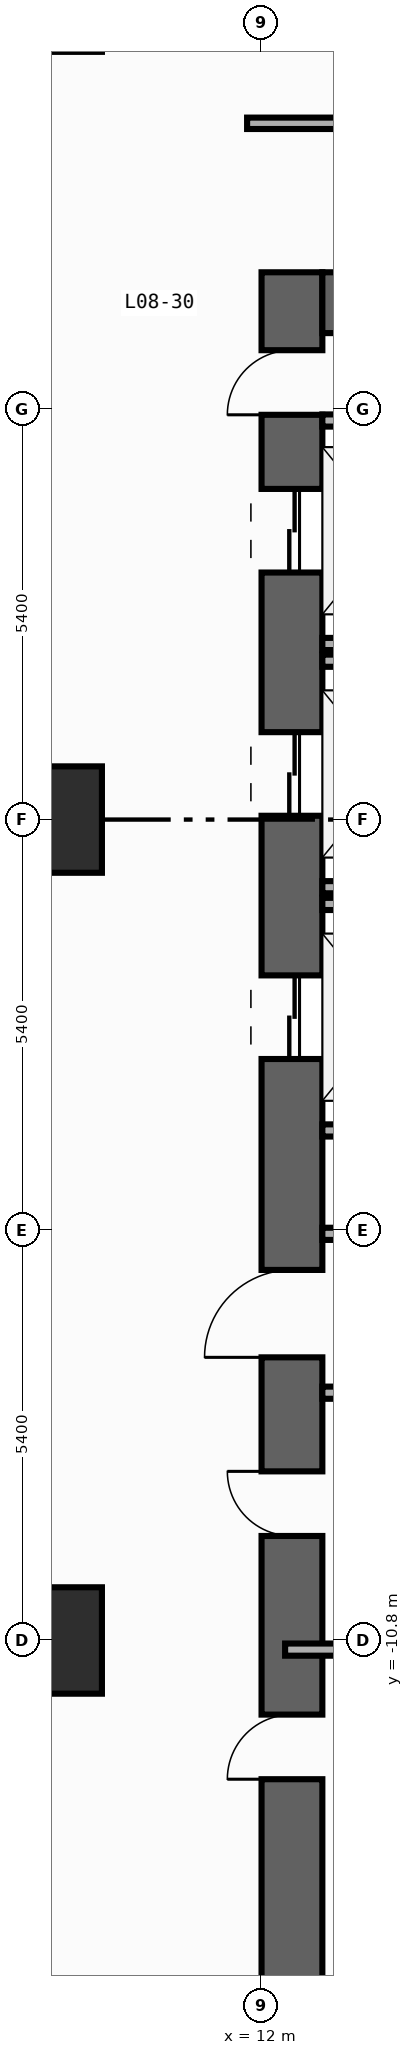
"""IFC4 building model, lengths in metres.
Left out: names, types, materials, properties, quantities, classifications, styles, units other than length and angle.
Written with IfcOpenShell. Run it as: python <this file> out.ifc"""

import sys

from ifc_helpers import new_model, si_unit, direction, frame, frame_2d, origin, origin_2d, place, context, subcontext, project, spatial, rectangle, extrude, element, fill, save


model = new_model("IFC4")
c1 = context("Model", 3, precision=1e-05, world=origin(), true_north=direction((0.0, 1.0)))
c2 = subcontext(c1, "Body", "Model", "MODEL_VIEW")
j1 = project(units=[si_unit("LENGTHUNIT", "METRE"), si_unit("PLANEANGLEUNIT", "RADIAN")], contexts=[c1])
p1 = place(None, origin())
s1 = spatial("IfcSite", under=j1, at=p1, CompositionType="ELEMENT")
p2 = place(p1, origin())
s2 = spatial("IfcBuilding", under=s1, at=p2, CompositionType="ELEMENT")
p3 = place(p2, frame((0.0, 0.0, 34.4)))
s3 = spatial("IfcBuildingStorey", under=s2, at=p3, CompositionType="ELEMENT", Elevation=34.4)
p4 = place(p3, frame((12.4, -19.8, 0.0), z_axis=(0.0, 0.0, 1.0), x_axis=(0.0, 1.0, 0.0)))
e1 = element("IfcWall", 1, at=p4, inside=s3, PredefinedType="SHEAR", context=c2, shape_type="SweptSolid", body=[
    extrude(rectangle(XDim=27.0, YDim=0.8, at=frame_2d((13.5, 0.0))), origin(), (0.0, 0.0, 1.0), 3.94),
])
p5 = place(p4, frame((23.05, 0.0, 0.0)))
e2 = element("IfcOpeningElement", 2, at=p5, cuts=e1, PredefinedType="OPENING", context=c2, shape_type="SweptSolid", body=[
    extrude(rectangle(XDim=1.1, YDim=2.2, at=frame_2d((0.55, 1.1))), frame((0.0, 0.41, 0.0), z_axis=(0.0, -1.0, 0.0), x_axis=(1.0, 0.0, 0.0)), (0.0, 0.0, 1.0), 0.82),
])
p6 = place(p4, frame((19.85, 0.0, 0.0)))
e3 = element("IfcOpeningElement", 3, at=p6, cuts=e1, PredefinedType="OPENING", context=c2, shape_type="SweptSolid", body=[
    extrude(rectangle(XDim=1.1, YDim=2.2, at=frame_2d((0.55, 1.1))), frame((0.0, 0.41, 0.0), z_axis=(0.0, -1.0, 0.0), x_axis=(1.0, 0.0, 0.0)), (0.0, 0.0, 1.0), 0.82),
])
p7 = place(p4, frame((16.65, 0.0, 0.0)))
e4 = element("IfcOpeningElement", 4, at=p7, cuts=e1, PredefinedType="OPENING", context=c2, shape_type="SweptSolid", body=[
    extrude(rectangle(XDim=1.1, YDim=2.2, at=frame_2d((0.55, 1.1))), frame((0.0, 0.41, 0.0), z_axis=(0.0, -1.0, 0.0), x_axis=(1.0, 0.0, 0.0)), (0.0, 0.0, 1.0), 0.82),
])
p8 = place(p4, frame((7.175, 0.0, 0.0)))
e5 = element("IfcOpeningElement", 5, at=p8, cuts=e1, PredefinedType="OPENING", context=c2, shape_type="SweptSolid", body=[
    extrude(rectangle(XDim=0.85, YDim=2.1, at=frame_2d((0.425, 1.05))), frame((0.0, 0.41, 0.0), z_axis=(0.0, -1.0, 0.0), x_axis=(1.0, 0.0, 0.0)), (0.0, 0.0, 1.0), 0.82),
])
p9 = place(p4, frame((10.375, 0.0, 0.0)))
e6 = element("IfcOpeningElement", 6, at=p9, cuts=e1, PredefinedType="OPENING", context=c2, shape_type="SweptSolid", body=[
    extrude(rectangle(XDim=0.85, YDim=2.1, at=frame_2d((0.425, 1.05))), frame((0.0, 0.41, 0.0), z_axis=(0.0, -1.0, 0.0), x_axis=(1.0, 0.0, 0.0)), (0.0, 0.0, 1.0), 0.82),
])
p10 = place(p4, frame((12.725, 0.0, 0.0)))
e7 = element("IfcOpeningElement", 7, at=p10, cuts=e1, PredefinedType="OPENING", context=c2, shape_type="SweptSolid", body=[
    extrude(rectangle(XDim=1.15, YDim=2.2, at=frame_2d((0.575, 1.1))), frame((0.0, 0.41, 0.0), z_axis=(0.0, -1.0, 0.0), x_axis=(1.0, 0.0, 0.0)), (0.0, 0.0, 1.0), 0.82),
])
p11 = place(p4, frame((25.125, 0.0, 0.0)))
e8 = element("IfcOpeningElement", 8, at=p11, cuts=e1, PredefinedType="OPENING", context=c2, shape_type="SweptSolid", body=[
    extrude(rectangle(XDim=0.85, YDim=2.1, at=frame_2d((0.425, 1.05))), frame((0.0, 0.41, 0.0), z_axis=(0.0, -1.0, 0.0), x_axis=(1.0, 0.0, 0.0)), (0.0, 0.0, 1.0), 0.82),
])
p12 = place(p3, frame((12.8, 6.8, 0.0), z_axis=(0.0, 0.0, 1.0), x_axis=(1.0, 0.0, 0.0)))
e9 = element("IfcWall", 9, at=p12, inside=s3, PredefinedType="SHEAR", context=c2, shape_type="SweptSolid", body=[
    extrude(rectangle(XDim=6.8, YDim=0.8, at=frame_2d((3.4, 0.0))), origin(), (0.0, 0.0, 1.0), 3.94),
])
for number, where, z_axis, x_axis in (
    (10, (9.2, -10.8, 0.0), (0.0, 0.0, 1.0), (1.0, 0.0, 0.0)),
    (11, (9.2, 0.0, 0.0), (0.0, 0.0, 1.0), (1.0, 0.0, 0.0)),
):
    element("IfcColumn", number, at=place(p3, frame(where, z_axis=z_axis, x_axis=x_axis)), inside=s3, PredefinedType="COLUMN", context=c2, shape_type="SweptSolid", body=[
        extrude(rectangle(XDim=1.4, YDim=1.4, at=origin_2d()), origin(), (0.0, 0.0, 1.0), 4.2),
    ])
for number, where, z_axis, x_axis in (
    (12, (12.8, 2.31, 0.0), (0.0, 0.0, 1.0), (1.0, 0.0, 0.0)),
    (13, (12.8, -0.89, 0.0), (0.0, 0.0, 1.0), (1.0, 0.0, 0.0)),
    (14, (12.8, 2.09, 0.0), (0.0, 0.0, 1.0), (1.0, 0.0, 0.0)),
    (15, (12.8, -4.09, 0.0), (0.0, 0.0, 1.0), (1.0, 0.0, 0.0)),
    (16, (12.8, -1.11, 0.0), (0.0, 0.0, 1.0), (1.0, 0.0, 0.0)),
):
    element("IfcWall", number, at=place(p3, frame(where, z_axis=z_axis, x_axis=x_axis)), inside=s3, PredefinedType="STANDARD", context=c2, shape_type="SweptSolid", body=[
        extrude(rectangle(XDim=2.19, YDim=0.16, at=frame_2d((1.095, 0.0))), origin(), (0.0, 0.0, 1.0), 3.94),
    ])
for number, where, z_axis, x_axis in (
    (17, (12.8, -5.45, 0.0), (0.0, 0.0, 1.0), (1.0, 0.0, 0.0)),
    (18, (12.8, -7.54, 0.0), (0.0, 0.0, 1.0), (1.0, 0.0, 0.0)),
    (19, (12.8, 5.25, 0.0), (0.0, 0.0, 1.0), (1.0, 0.0, 0.0)),
):
    element("IfcWall", number, at=place(p3, frame(where, z_axis=z_axis, x_axis=x_axis)), inside=s3, PredefinedType="STANDARD", context=c2, shape_type="SweptSolid", body=[
        extrude(rectangle(XDim=2.6, YDim=0.16, at=frame_2d((1.3, 0.0))), origin(), (0.0, 0.0, 1.0), 3.94),
    ])
p13 = place(p3, frame((12.31, -10.92, 0.0), z_axis=(0.0, 0.0, 1.0), x_axis=(1.0, 0.0, 0.0)))
e20 = element("IfcWall", 20, at=p13, inside=s3, PredefinedType="PARTITIONING", context=c2, shape_type="SweptSolid", body=[
    extrude(rectangle(XDim=3.065, YDim=0.16, at=frame_2d((1.532, 0.0))), origin(), (0.0, 0.0, 1.0), 3.14),
])
p14 = place(p3, frame((11.81, 9.16, 0.0), z_axis=(0.0, 0.0, 1.0), x_axis=(1.0, 0.0, 0.0)))
e21 = element("IfcWall", 21, at=p14, inside=s3, PredefinedType="PARTITIONING", context=c2, shape_type="SweptSolid", body=[
    extrude(rectangle(XDim=8.83, YDim=0.15, at=frame_2d((4.415, 0.0))), origin(), (0.0, 0.0, 1.0), 3.94),
])
p15 = place(p14, frame((5.067, 0.0, 0.0)))
e22 = element("IfcOpeningElement", 22, at=p15, cuts=e21, PredefinedType="OPENING", context=c2, shape_type="SweptSolid", body=[
    extrude(rectangle(XDim=0.9, YDim=2.15, at=frame_2d((0.45, 1.075))), frame((0.0, 0.085, 0.0), z_axis=(0.0, -1.0, 0.0), x_axis=(1.0, 0.0, 0.0)), (0.0, 0.0, 1.0), 0.17),
])
p16 = place(p5, origin())
e23 = element("IfcDoor", 23, at=p16, inside=s3, OperationType="DOUBLE_DOOR_SLIDING", PredefinedType="DOOR", context=c2, shape_type="SweptSolid", body=[
    extrude(rectangle(XDim=1.1, YDim=2.2, at=frame_2d((0.55, 1.1))), frame((0.0, 0.025, 0.0), z_axis=(0.0, -1.0, 0.0), x_axis=(1.0, 0.0, 0.0)), (0.0, 0.0, 1.0), 0.05),
])
fill(e2, e23)
p17 = place(p6, origin())
e24 = element("IfcDoor", 24, at=p17, inside=s3, OperationType="DOUBLE_DOOR_SLIDING", PredefinedType="DOOR", context=c2, shape_type="SweptSolid", body=[
    extrude(rectangle(XDim=1.1, YDim=2.2, at=frame_2d((0.55, 1.1))), frame((0.0, 0.025, 0.0), z_axis=(0.0, -1.0, 0.0), x_axis=(1.0, 0.0, 0.0)), (0.0, 0.0, 1.0), 0.05),
])
fill(e3, e24)
p18 = place(p7, origin())
e25 = element("IfcDoor", 25, at=p18, inside=s3, OperationType="DOUBLE_DOOR_SLIDING", PredefinedType="DOOR", context=c2, shape_type="SweptSolid", body=[
    extrude(rectangle(XDim=1.1, YDim=2.2, at=frame_2d((0.55, 1.1))), frame((0.0, 0.025, 0.0), z_axis=(0.0, -1.0, 0.0), x_axis=(1.0, 0.0, 0.0)), (0.0, 0.0, 1.0), 0.05),
])
fill(e4, e25)
p19 = place(p8, origin())
e26 = element("IfcDoor", 26, at=p19, inside=s3, OperationType="SINGLE_SWING_LEFT", PredefinedType="DOOR", context=c2, shape_type="SweptSolid", body=[
    extrude(rectangle(XDim=0.85, YDim=2.1, at=frame_2d((0.425, 1.05))), frame((0.0, 0.025, 0.0), z_axis=(0.0, -1.0, 0.0), x_axis=(1.0, 0.0, 0.0)), (0.0, 0.0, 1.0), 0.05),
])
fill(e5, e26)
p20 = place(p9, origin())
e27 = element("IfcDoor", 27, at=p20, inside=s3, OperationType="SINGLE_SWING_RIGHT", PredefinedType="DOOR", context=c2, shape_type="SweptSolid", body=[
    extrude(rectangle(XDim=0.85, YDim=2.1, at=frame_2d((0.425, 1.05))), frame((0.0, 0.025, 0.0), z_axis=(0.0, -1.0, 0.0), x_axis=(1.0, 0.0, 0.0)), (0.0, 0.0, 1.0), 0.05),
])
fill(e6, e27)
p21 = place(p10, origin())
e28 = element("IfcDoor", 28, at=p21, inside=s3, OperationType="SINGLE_SWING_LEFT", PredefinedType="DOOR", context=c2, shape_type="SweptSolid", body=[
    extrude(rectangle(XDim=1.15, YDim=2.2, at=frame_2d((0.575, 1.1))), frame((0.0, 0.025, 0.0), z_axis=(0.0, -1.0, 0.0), x_axis=(1.0, 0.0, 0.0)), (0.0, 0.0, 1.0), 0.05),
])
fill(e7, e28)
p22 = place(p11, origin())
e29 = element("IfcDoor", 29, at=p22, inside=s3, OperationType="SINGLE_SWING_LEFT", PredefinedType="DOOR", context=c2, shape_type="SweptSolid", body=[
    extrude(rectangle(XDim=0.85, YDim=2.1, at=frame_2d((0.425, 1.05))), frame((0.0, 0.025, 0.0), z_axis=(0.0, -1.0, 0.0), x_axis=(1.0, 0.0, 0.0)), (0.0, 0.0, 1.0), 0.05),
])
fill(e8, e29)
save(model, sys.argv[1])
